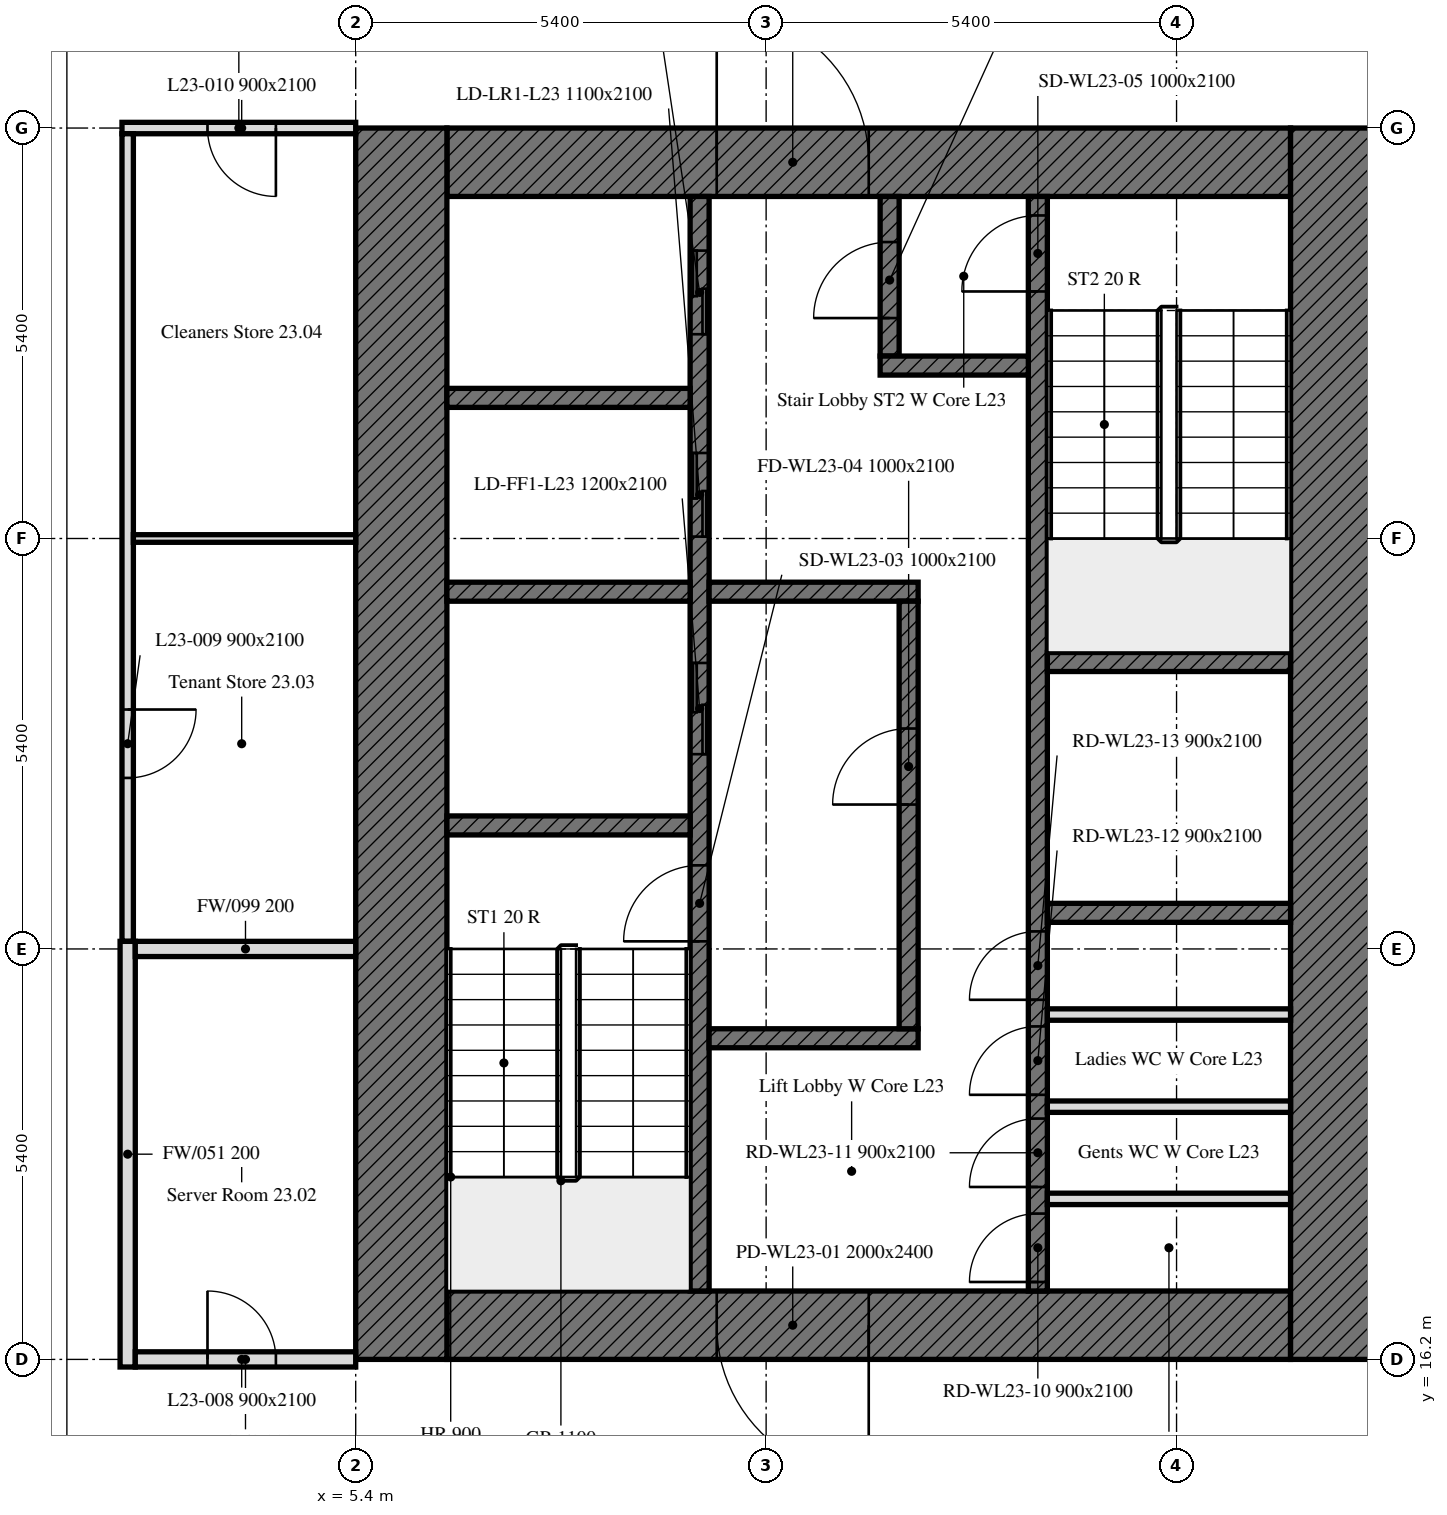
"""IFC4 building model, lengths in metres.
Left out: names, types, materials, properties, quantities, classifications, styles, units other than length and angle.
Written with IfcOpenShell. Run it as: python <this file> out.ifc"""

import sys

from ifc_helpers import new_model, si_unit, direction, frame, frame_2d, origin, place, context, subcontext, project, spatial, rectangle, extrude, element, fill, save


model = new_model("IFC4")
c1 = context("Model", 3, precision=1e-05, world=origin(), true_north=direction((0.0, 1.0)))
c2 = subcontext(c1, "Body", "Model", "MODEL_VIEW")
j1 = project(units=[si_unit("LENGTHUNIT", "METRE"), si_unit("PLANEANGLEUNIT", "RADIAN")], contexts=[c1])
p1 = place(None, origin())
s1 = spatial("IfcSite", under=j1, at=p1, CompositionType="ELEMENT")
p2 = place(p1, origin())
s2 = spatial("IfcBuilding", under=s1, at=p2, CompositionType="ELEMENT")
p3 = place(p2, frame((0.0, 0.0, 99.2)))
s3 = spatial("IfcBuildingStorey", under=s2, at=p3, CompositionType="ELEMENT", Elevation=99.2)
p4 = place(p3, frame((17.7, 16.65, 0.0), z_axis=(0.0, 0.0, 1.0), x_axis=(-1.0, 0.0, 0.0)))
e1 = element("IfcWall", 1, at=p4, inside=s3, PredefinedType="SOLIDWALL", context=c2, shape_type="SweptSolid", body=[
    extrude(rectangle(XDim=11.1, YDim=0.9, at=frame_2d((5.55, 0.0))), origin(), (0.0, 0.0, 1.0), 3.5),
])
p5 = place(p4, frame((5.55, 0.0, 0.0)))
e2 = element("IfcOpeningElement", 2, at=p5, cuts=e1, PredefinedType="OPENING", context=c2, shape_type="SweptSolid", body=[
    extrude(rectangle(XDim=2.0, YDim=2.4, at=frame_2d((1.0, 1.2))), frame((0.0, 0.45, 0.0), z_axis=(0.0, -1.0, 0.0), x_axis=(1.0, 0.0, 0.0)), (0.0, 0.0, 1.0), 0.9),
])
p6 = place(p3, frame((6.6, 31.95, 0.0), z_axis=(0.0, 0.0, 1.0), x_axis=(1.0, 0.0, 0.0)))
e3 = element("IfcWall", 3, at=p6, inside=s3, PredefinedType="SOLIDWALL", context=c2, shape_type="SweptSolid", body=[
    extrude(rectangle(XDim=11.1, YDim=0.9, at=frame_2d((5.55, 0.0))), origin(), (0.0, 0.0, 1.0), 3.5),
])
p7 = place(p6, frame((3.55, 0.0, 0.0)))
e4 = element("IfcOpeningElement", 4, at=p7, cuts=e3, PredefinedType="OPENING", context=c2, shape_type="SweptSolid", body=[
    extrude(rectangle(XDim=2.0, YDim=2.4, at=frame_2d((1.0, 1.2))), frame((0.0, 0.45, 0.0), z_axis=(0.0, -1.0, 0.0), x_axis=(1.0, 0.0, 0.0)), (0.0, 0.0, 1.0), 0.9),
])
for number, where, z_axis, x_axis in (
    (5, (6.0, 16.2, 0.0), (0.0, 0.0, 1.0), (0.0, 1.0, 0.0)),
    (6, (18.3, 32.4, 0.0), (0.0, 0.0, 1.0), (0.0, -1.0, 0.0)),
):
    element("IfcWall", number, at=place(p3, frame(where, z_axis=z_axis, x_axis=x_axis)), inside=s3, PredefinedType="SOLIDWALL", context=c2, shape_type="SweptSolid", body=[
        extrude(rectangle(XDim=16.2, YDim=1.2, at=frame_2d((8.1, 0.0))), origin(), (0.0, 0.0, 1.0), 3.5),
    ])
p8 = place(p3, frame((9.925, 17.1, 0.0), z_axis=(0.0, 0.0, 1.0), x_axis=(0.0, 1.0, 0.0)))
e7 = element("IfcWall", 7, at=p8, inside=s3, PredefinedType="SOLIDWALL", context=c2, shape_type="SweptSolid", body=[
    extrude(rectangle(XDim=14.4, YDim=0.25, at=frame_2d((7.2, 0.0))), origin(), (0.0, 0.0, 1.0), 3.5),
])
p9 = place(p8, frame((4.6, 0.0, 0.0)))
e8 = element("IfcOpeningElement", 8, at=p9, cuts=e7, PredefinedType="OPENING", context=c2, shape_type="SweptSolid", body=[
    extrude(rectangle(XDim=1.0, YDim=2.1, at=frame_2d((0.5, 1.05))), frame((0.0, 0.125, 0.0), z_axis=(0.0, -1.0, 0.0), x_axis=(1.0, 0.0, 0.0)), (0.0, 0.0, 1.0), 0.25),
])
p10 = place(p8, frame((7.062, 0.0, 0.0)))
e9 = element("IfcOpeningElement", 9, at=p10, cuts=e7, PredefinedType="OPENING", context=c2, shape_type="SweptSolid", body=[
    extrude(rectangle(XDim=1.2, YDim=2.1, at=frame_2d((0.6, 1.05))), frame((0.0, 0.125, 0.0), z_axis=(0.0, -1.0, 0.0), x_axis=(1.0, 0.0, 0.0)), (0.0, 0.0, 1.0), 0.25),
])
p11 = place(p8, frame((9.925, 0.0, 0.0)))
e10 = element("IfcOpeningElement", 10, at=p11, cuts=e7, PredefinedType="OPENING", context=c2, shape_type="SweptSolid", body=[
    extrude(rectangle(XDim=1.1, YDim=2.1, at=frame_2d((0.55, 1.05))), frame((0.0, 0.125, 0.0), z_axis=(0.0, -1.0, 0.0), x_axis=(1.0, 0.0, 0.0)), (0.0, 0.0, 1.0), 0.25),
])
p12 = place(p8, frame((12.587, 0.0, 0.0)))
e11 = element("IfcOpeningElement", 11, at=p12, cuts=e7, PredefinedType="OPENING", context=c2, shape_type="SweptSolid", body=[
    extrude(rectangle(XDim=1.1, YDim=2.1, at=frame_2d((0.55, 1.05))), frame((0.0, 0.125, 0.0), z_axis=(0.0, -1.0, 0.0), x_axis=(1.0, 0.0, 0.0)), (0.0, 0.0, 1.0), 0.25),
])
p13 = place(p3, frame((14.375, 17.1, 0.0), z_axis=(0.0, 0.0, 1.0), x_axis=(0.0, 1.0, 0.0)))
e12 = element("IfcWall", 12, at=p13, inside=s3, PredefinedType="SOLIDWALL", context=c2, shape_type="SweptSolid", body=[
    extrude(rectangle(XDim=14.4, YDim=0.25, at=frame_2d((7.2, 0.0))), origin(), (0.0, 0.0, 1.0), 3.5),
])
p14 = place(p13, frame((13.15, 0.0, 0.0)))
e13 = element("IfcOpeningElement", 13, at=p14, cuts=e12, PredefinedType="OPENING", context=c2, shape_type="SweptSolid", body=[
    extrude(rectangle(XDim=1.0, YDim=2.1, at=frame_2d((0.5, 1.05))), frame((0.0, 0.125, 0.0), z_axis=(0.0, -1.0, 0.0), x_axis=(1.0, 0.0, 0.0)), (0.0, 0.0, 1.0), 0.25),
])
p15 = place(p13, frame((0.118, 0.0, 0.0)))
e14 = element("IfcOpeningElement", 14, at=p15, cuts=e12, PredefinedType="OPENING", context=c2, shape_type="SweptSolid", body=[
    extrude(rectangle(XDim=0.9, YDim=2.1, at=frame_2d((0.45, 1.05))), frame((0.0, 0.125, 0.0), z_axis=(0.0, -1.0, 0.0), x_axis=(1.0, 0.0, 0.0)), (0.0, 0.0, 1.0), 0.25),
])
p16 = place(p13, frame((1.368, 0.0, 0.0)))
e15 = element("IfcOpeningElement", 15, at=p16, cuts=e12, PredefinedType="OPENING", context=c2, shape_type="SweptSolid", body=[
    extrude(rectangle(XDim=0.9, YDim=2.1, at=frame_2d((0.45, 1.05))), frame((0.0, 0.125, 0.0), z_axis=(0.0, -1.0, 0.0), x_axis=(1.0, 0.0, 0.0)), (0.0, 0.0, 1.0), 0.25),
])
p17 = place(p13, frame((2.581, 0.0, 0.0)))
e16 = element("IfcOpeningElement", 16, at=p17, cuts=e12, PredefinedType="OPENING", context=c2, shape_type="SweptSolid", body=[
    extrude(rectangle(XDim=0.9, YDim=2.1, at=frame_2d((0.45, 1.05))), frame((0.0, 0.125, 0.0), z_axis=(0.0, -1.0, 0.0), x_axis=(1.0, 0.0, 0.0)), (0.0, 0.0, 1.0), 0.25),
])
p18 = place(p13, frame((3.831, 0.0, 0.0)))
e17 = element("IfcOpeningElement", 17, at=p18, cuts=e12, PredefinedType="OPENING", context=c2, shape_type="SweptSolid", body=[
    extrude(rectangle(XDim=0.9, YDim=2.1, at=frame_2d((0.45, 1.05))), frame((0.0, 0.125, 0.0), z_axis=(0.0, -1.0, 0.0), x_axis=(1.0, 0.0, 0.0)), (0.0, 0.0, 1.0), 0.25),
])
for number, where, z_axis, x_axis in (
    (18, (6.6, 23.225, 0.0), (0.0, 0.0, 1.0), (1.0, 0.0, 0.0)),
    (19, (14.5, 25.375, 0.0), (0.0, 0.0, 1.0), (1.0, 0.0, 0.0)),
    (20, (14.5, 22.075, 0.0), (0.0, 0.0, 1.0), (1.0, 0.0, 0.0)),
    (21, (6.6, 26.3, 0.0), (0.0, 0.0, 1.0), (1.0, 0.0, 0.0)),
):
    element("IfcWall", number, at=place(p3, frame(where, z_axis=z_axis, x_axis=x_axis)), inside=s3, PredefinedType="SOLIDWALL", context=c2, shape_type="SweptSolid", body=[
        extrude(rectangle(XDim=3.2, YDim=0.25, at=frame_2d((1.6, 0.0))), origin(), (0.0, 0.0, 1.0), 3.5),
    ])
for number, where, z_axis, x_axis in (
    (22, (10.05, 26.3, 0.0), (0.0, 0.0, 1.0), (1.0, 0.0, 0.0)),
    (23, (10.05, 20.425, 0.0), (0.0, 0.0, 1.0), (1.0, 0.0, 0.0)),
):
    element("IfcWall", number, at=place(p3, frame(where, z_axis=z_axis, x_axis=x_axis)), inside=s3, PredefinedType="SOLIDWALL", context=c2, shape_type="SweptSolid", body=[
        extrude(rectangle(XDim=2.75, YDim=0.25, at=frame_2d((1.375, 0.0))), origin(), (0.0, 0.0, 1.0), 3.5),
    ])
p19 = place(p3, frame((12.425, 29.4, 0.0), z_axis=(0.0, 0.0, 1.0), x_axis=(0.0, 1.0, 0.0)))
e24 = element("IfcWall", 24, at=p19, inside=s3, PredefinedType="SOLIDWALL", context=c2, shape_type="SweptSolid", body=[
    extrude(rectangle(XDim=2.1, YDim=0.25, at=frame_2d((1.05, 0.0))), origin(), (0.0, 0.0, 1.0), 3.5),
])
p20 = place(p19, frame((0.5, 0.0, 0.0)))
e25 = element("IfcOpeningElement", 25, at=p20, cuts=e24, PredefinedType="OPENING", context=c2, shape_type="SweptSolid", body=[
    extrude(rectangle(XDim=1.0, YDim=2.1, at=frame_2d((0.5, 1.05))), frame((0.0, 0.125, 0.0), z_axis=(0.0, -1.0, 0.0), x_axis=(1.0, 0.0, 0.0)), (0.0, 0.0, 1.0), 0.25),
])
p21 = place(p3, frame((12.3, 29.275, 0.0), z_axis=(0.0, 0.0, 1.0), x_axis=(1.0, 0.0, 0.0)))
e26 = element("IfcWall", 26, at=p21, inside=s3, PredefinedType="SOLIDWALL", context=c2, shape_type="SweptSolid", body=[
    extrude(rectangle(XDim=1.95, YDim=0.25, at=frame_2d((0.975, 0.0))), origin(), (0.0, 0.0, 1.0), 3.5),
])
p22 = place(p3, frame((12.675, 20.55, 0.0), z_axis=(0.0, 0.0, 1.0), x_axis=(0.0, 1.0, 0.0)))
e27 = element("IfcWall", 27, at=p22, inside=s3, PredefinedType="SOLIDWALL", context=c2, shape_type="SweptSolid", body=[
    extrude(rectangle(XDim=5.625, YDim=0.25, at=frame_2d((2.812, 0.0))), origin(), (0.0, 0.0, 1.0), 3.5),
])
p23 = place(p22, frame((2.95, 0.0, 0.0)))
e28 = element("IfcOpeningElement", 28, at=p23, cuts=e27, PredefinedType="OPENING", context=c2, shape_type="SweptSolid", body=[
    extrude(rectangle(XDim=1.0, YDim=2.1, at=frame_2d((0.5, 1.05))), frame((0.0, 0.125, 0.0), z_axis=(0.0, -1.0, 0.0), x_axis=(1.0, 0.0, 0.0)), (0.0, 0.0, 1.0), 0.25),
])
p24 = place(p3, frame((6.6, 28.85, 0.0), z_axis=(0.0, 0.0, 1.0), x_axis=(1.0, 0.0, 0.0)))
e29 = element("IfcWall", 29, at=p24, inside=s3, PredefinedType="SOLIDWALL", context=c2, shape_type="SweptSolid", body=[
    extrude(rectangle(XDim=3.2, YDim=0.25, at=frame_2d((1.6, 0.0))), origin(), (0.0, 0.0, 1.0), 3.5),
])
for number, where, z_axis, x_axis in (
    (30, (14.5, 18.312, 0.0), (0.0, 0.0, 1.0), (1.0, 0.0, 0.0)),
    (31, (14.5, 19.525, 0.0), (0.0, 0.0, 1.0), (1.0, 0.0, 0.0)),
    (32, (14.5, 20.737, 0.0), (0.0, 0.0, 1.0), (1.0, 0.0, 0.0)),
):
    element("IfcWall", number, at=place(p3, frame(where, z_axis=z_axis, x_axis=x_axis)), inside=s3, PredefinedType="PARTITIONING", context=c2, shape_type="SweptSolid", body=[
        extrude(rectangle(XDim=3.2, YDim=0.15, at=frame_2d((1.6, 0.0))), origin(), (0.0, 0.0, 1.0), 3.5),
    ])
p25 = place(p3, frame((5.4, 32.4, 0.0), z_axis=(0.0, 0.0, 1.0), x_axis=(-1.0, 0.0, 0.0)))
e33 = element("IfcWall", 33, at=p25, inside=s3, PredefinedType="PARTITIONING", context=c2, shape_type="SweptSolid", body=[
    extrude(rectangle(XDim=3.075, YDim=0.15, at=frame_2d((1.538, 0.0))), origin(), (0.0, 0.0, 1.0), 2.75),
])
p26 = place(p25, frame((1.05, 0.0, 0.0)))
e34 = element("IfcOpeningElement", 34, at=p26, cuts=e33, PredefinedType="OPENING", context=c2, shape_type="SweptSolid", body=[
    extrude(rectangle(XDim=0.9, YDim=2.1, at=frame_2d((0.45, 1.05))), frame((0.0, 0.075, 0.0), z_axis=(0.0, -1.0, 0.0), x_axis=(1.0, 0.0, 0.0)), (0.0, 0.0, 1.0), 0.15),
])
p27 = place(p3, frame((2.4, 32.325, 0.0), z_axis=(0.0, 0.0, 1.0), x_axis=(0.0, -1.0, 0.0)))
e35 = element("IfcWall", 35, at=p27, inside=s3, PredefinedType="PARTITIONING", context=c2, shape_type="SweptSolid", body=[
    extrude(rectangle(XDim=10.625, YDim=0.15, at=frame_2d((5.312, 0.0))), origin(), (0.0, 0.0, 1.0), 3.5),
])
p28 = place(p27, frame((7.575, 0.0, 0.0)))
e36 = element("IfcOpeningElement", 36, at=p28, cuts=e35, PredefinedType="OPENING", context=c2, shape_type="SweptSolid", body=[
    extrude(rectangle(XDim=0.9, YDim=2.1, at=frame_2d((0.45, 1.05))), frame((0.0, 0.075, 0.0), z_axis=(0.0, -1.0, 0.0), x_axis=(1.0, 0.0, 0.0)), (0.0, 0.0, 1.0), 0.15),
])
p29 = place(p3, frame((2.4, 21.7, 0.0), z_axis=(0.0, 0.0, 1.0), x_axis=(0.0, -1.0, 0.0)))
e37 = element("IfcWall", 37, at=p29, inside=s3, PredefinedType="PARTITIONING", context=c2, shape_type="SweptSolid", body=[
    extrude(rectangle(XDim=5.6, YDim=0.2, at=frame_2d((2.8, 0.0))), origin(), (0.0, 0.0, 1.0), 3.5),
])
p30 = place(p3, frame((2.5, 16.2, 0.0), z_axis=(0.0, 0.0, 1.0), x_axis=(1.0, 0.0, 0.0)))
e38 = element("IfcWall", 38, at=p30, inside=s3, PredefinedType="PARTITIONING", context=c2, shape_type="SweptSolid", body=[
    extrude(rectangle(XDim=2.9, YDim=0.2, at=frame_2d((1.45, 0.0))), origin(), (0.0, 0.0, 1.0), 2.75),
])
p31 = place(p30, frame((0.95, 0.0, 0.0)))
e39 = element("IfcOpeningElement", 39, at=p31, cuts=e38, PredefinedType="OPENING", context=c2, shape_type="SweptSolid", body=[
    extrude(rectangle(XDim=0.9, YDim=2.1, at=frame_2d((0.45, 1.05))), frame((0.0, 0.1, 0.0), z_axis=(0.0, -1.0, 0.0), x_axis=(1.0, 0.0, 0.0)), (0.0, 0.0, 1.0), 0.2),
])
p32 = place(p3, frame((5.4, 21.6, 0.0), z_axis=(0.0, 0.0, 1.0), x_axis=(-1.0, 0.0, 0.0)))
e40 = element("IfcWall", 40, at=p32, inside=s3, PredefinedType="PARTITIONING", context=c2, shape_type="SweptSolid", body=[
    extrude(rectangle(XDim=2.9, YDim=0.2, at=frame_2d((1.45, 0.0))), origin(), (0.0, 0.0, 1.0), 2.75),
])
p33 = place(p3, frame((5.4, 27.0, 0.0), z_axis=(0.0, 0.0, 1.0), x_axis=(-1.0, 0.0, 0.0)))
e41 = element("IfcWall", 41, at=p33, inside=s3, PredefinedType="PARTITIONING", context=c2, shape_type="SweptSolid", body=[
    extrude(rectangle(XDim=2.925, YDim=0.1, at=frame_2d((1.462, 0.0))), origin(), (0.0, 0.0, 1.0), 2.75),
])
p34 = place(p5, origin())
e42 = element("IfcDoor", 42, at=p34, inside=s3, OperationType="DOUBLE_DOOR_SINGLE_SWING", PredefinedType="DOOR", context=c2, shape_type="SweptSolid", body=[
    extrude(rectangle(XDim=2.0, YDim=2.4, at=frame_2d((1.0, 1.2))), frame((0.0, 0.025, 0.0), z_axis=(0.0, -1.0, 0.0), x_axis=(1.0, 0.0, 0.0)), (0.0, 0.0, 1.0), 0.05),
])
fill(e2, e42)
p35 = place(p7, origin())
e43 = element("IfcDoor", 43, at=p35, inside=s3, OperationType="DOUBLE_DOOR_SINGLE_SWING", PredefinedType="DOOR", context=c2, shape_type="SweptSolid", body=[
    extrude(rectangle(XDim=2.0, YDim=2.4, at=frame_2d((1.0, 1.2))), frame((0.0, 0.025, 0.0), z_axis=(0.0, -1.0, 0.0), x_axis=(1.0, 0.0, 0.0)), (0.0, 0.0, 1.0), 0.05),
])
fill(e4, e43)
p36 = place(p9, origin())
e44 = element("IfcDoor", 44, at=p36, inside=s3, OperationType="SINGLE_SWING_LEFT", PredefinedType="DOOR", context=c2, shape_type="SweptSolid", body=[
    extrude(rectangle(XDim=1.0, YDim=2.1, at=frame_2d((0.5, 1.05))), frame((0.0, 0.025, 0.0), z_axis=(0.0, -1.0, 0.0), x_axis=(1.0, 0.0, 0.0)), (0.0, 0.0, 1.0), 0.05),
])
fill(e8, e44)
p37 = place(p23, origin())
e45 = element("IfcDoor", 45, at=p37, inside=s3, OperationType="SINGLE_SWING_LEFT", PredefinedType="DOOR", context=c2, shape_type="SweptSolid", body=[
    extrude(rectangle(XDim=1.0, YDim=2.1, at=frame_2d((0.5, 1.05))), frame((0.0, 0.025, 0.0), z_axis=(0.0, -1.0, 0.0), x_axis=(1.0, 0.0, 0.0)), (0.0, 0.0, 1.0), 0.05),
])
fill(e28, e45)
p38 = place(p14, origin())
e46 = element("IfcDoor", 46, at=p38, inside=s3, OperationType="SINGLE_SWING_LEFT", PredefinedType="DOOR", context=c2, shape_type="SweptSolid", body=[
    extrude(rectangle(XDim=1.0, YDim=2.1, at=frame_2d((0.5, 1.05))), frame((0.0, 0.025, 0.0), z_axis=(0.0, -1.0, 0.0), x_axis=(1.0, 0.0, 0.0)), (0.0, 0.0, 1.0), 0.05),
])
fill(e13, e46)
p39 = place(p20, origin())
e47 = element("IfcDoor", 47, at=p39, inside=s3, OperationType="SINGLE_SWING_LEFT", PredefinedType="DOOR", context=c2, shape_type="SweptSolid", body=[
    extrude(rectangle(XDim=1.0, YDim=2.1, at=frame_2d((0.5, 1.05))), frame((0.0, 0.025, 0.0), z_axis=(0.0, -1.0, 0.0), x_axis=(1.0, 0.0, 0.0)), (0.0, 0.0, 1.0), 0.05),
])
fill(e25, e47)
p40 = place(p10, origin())
e48 = element("IfcDoor", 48, at=p40, inside=s3, OperationType="DOUBLE_DOOR_SLIDING", PredefinedType="DOOR", context=c2, shape_type="SweptSolid", body=[
    extrude(rectangle(XDim=1.2, YDim=2.1, at=frame_2d((0.6, 1.05))), frame((0.0, 0.025, 0.0), z_axis=(0.0, -1.0, 0.0), x_axis=(1.0, 0.0, 0.0)), (0.0, 0.0, 1.0), 0.05),
])
fill(e9, e48)
p41 = place(p11, origin())
e49 = element("IfcDoor", 49, at=p41, inside=s3, OperationType="DOUBLE_DOOR_SLIDING", PredefinedType="DOOR", context=c2, shape_type="SweptSolid", body=[
    extrude(rectangle(XDim=1.1, YDim=2.1, at=frame_2d((0.55, 1.05))), frame((0.0, 0.025, 0.0), z_axis=(0.0, -1.0, 0.0), x_axis=(1.0, 0.0, 0.0)), (0.0, 0.0, 1.0), 0.05),
])
fill(e10, e49)
p42 = place(p12, origin())
e50 = element("IfcDoor", 50, at=p42, inside=s3, OperationType="DOUBLE_DOOR_SLIDING", PredefinedType="DOOR", context=c2, shape_type="SweptSolid", body=[
    extrude(rectangle(XDim=1.1, YDim=2.1, at=frame_2d((0.55, 1.05))), frame((0.0, 0.025, 0.0), z_axis=(0.0, -1.0, 0.0), x_axis=(1.0, 0.0, 0.0)), (0.0, 0.0, 1.0), 0.05),
])
fill(e11, e50)
p43 = place(p15, origin())
e51 = element("IfcDoor", 51, at=p43, inside=s3, OperationType="SINGLE_SWING_LEFT", PredefinedType="DOOR", context=c2, shape_type="SweptSolid", body=[
    extrude(rectangle(XDim=0.9, YDim=2.1, at=frame_2d((0.45, 1.05))), frame((0.0, 0.025, 0.0), z_axis=(0.0, -1.0, 0.0), x_axis=(1.0, 0.0, 0.0)), (0.0, 0.0, 1.0), 0.05),
])
fill(e14, e51)
p44 = place(p16, origin())
e52 = element("IfcDoor", 52, at=p44, inside=s3, OperationType="SINGLE_SWING_LEFT", PredefinedType="DOOR", context=c2, shape_type="SweptSolid", body=[
    extrude(rectangle(XDim=0.9, YDim=2.1, at=frame_2d((0.45, 1.05))), frame((0.0, 0.025, 0.0), z_axis=(0.0, -1.0, 0.0), x_axis=(1.0, 0.0, 0.0)), (0.0, 0.0, 1.0), 0.05),
])
fill(e15, e52)
p45 = place(p17, origin())
e53 = element("IfcDoor", 53, at=p45, inside=s3, OperationType="SINGLE_SWING_LEFT", PredefinedType="DOOR", context=c2, shape_type="SweptSolid", body=[
    extrude(rectangle(XDim=0.9, YDim=2.1, at=frame_2d((0.45, 1.05))), frame((0.0, 0.025, 0.0), z_axis=(0.0, -1.0, 0.0), x_axis=(1.0, 0.0, 0.0)), (0.0, 0.0, 1.0), 0.05),
])
fill(e16, e53)
p46 = place(p18, origin())
e54 = element("IfcDoor", 54, at=p46, inside=s3, OperationType="SINGLE_SWING_LEFT", PredefinedType="DOOR", context=c2, shape_type="SweptSolid", body=[
    extrude(rectangle(XDim=0.9, YDim=2.1, at=frame_2d((0.45, 1.05))), frame((0.0, 0.025, 0.0), z_axis=(0.0, -1.0, 0.0), x_axis=(1.0, 0.0, 0.0)), (0.0, 0.0, 1.0), 0.05),
])
fill(e17, e54)
p47 = place(p31, origin())
e55 = element("IfcDoor", 55, at=p47, inside=s3, OperationType="SINGLE_SWING_RIGHT", PredefinedType="DOOR", context=c2, shape_type="SweptSolid", body=[
    extrude(rectangle(XDim=0.9, YDim=2.1, at=frame_2d((0.45, 1.05))), frame((0.0, 0.025, 0.0), z_axis=(0.0, -1.0, 0.0), x_axis=(1.0, 0.0, 0.0)), (0.0, 0.0, 1.0), 0.05),
])
fill(e39, e55)
p48 = place(p28, origin())
e56 = element("IfcDoor", 56, at=p48, inside=s3, OperationType="SINGLE_SWING_RIGHT", PredefinedType="DOOR", context=c2, shape_type="SweptSolid", body=[
    extrude(rectangle(XDim=0.9, YDim=2.1, at=frame_2d((0.45, 1.05))), frame((0.0, 0.025, 0.0), z_axis=(0.0, -1.0, 0.0), x_axis=(1.0, 0.0, 0.0)), (0.0, 0.0, 1.0), 0.05),
])
fill(e36, e56)
p49 = place(p26, origin())
e57 = element("IfcDoor", 57, at=p49, inside=s3, OperationType="SINGLE_SWING_RIGHT", PredefinedType="DOOR", context=c2, shape_type="SweptSolid", body=[
    extrude(rectangle(XDim=0.9, YDim=2.1, at=frame_2d((0.45, 1.05))), frame((0.0, 0.025, 0.0), z_axis=(0.0, -1.0, 0.0), x_axis=(1.0, 0.0, 0.0)), (0.0, 0.0, 1.0), 0.05),
])
fill(e34, e57)
save(model, sys.argv[1])
